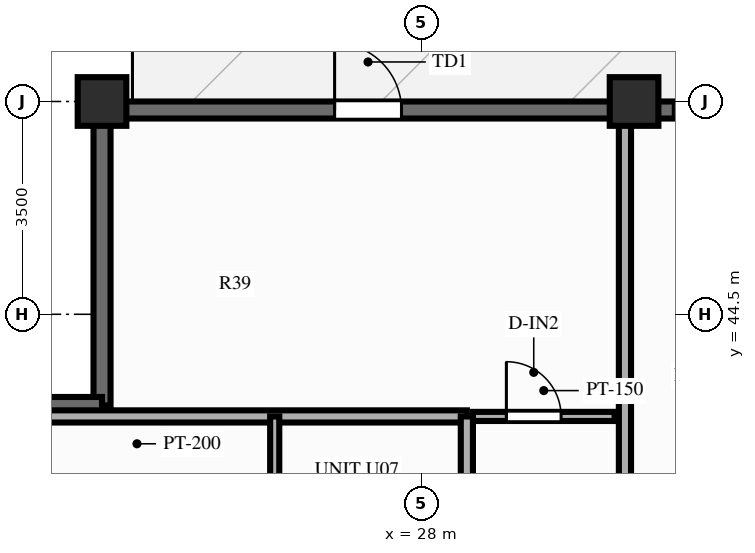
"""IFC4 building model, lengths in metres.
Left out: names, types, materials, properties, quantities, classifications, styles, units other than length and angle.
Written with IfcOpenShell. Run it as: python <this file> out.ifc"""

import sys

from ifc_helpers import new_model, si_unit, direction, frame, frame_2d, origin, origin_2d, place, context, subcontext, project, spatial, rectangle, extrude, source, transform, mapped, element, fill, save


model = new_model("IFC4")
c1 = context("Model", 3, precision=1e-05, world=origin(), true_north=direction((0.0, 1.0)))
c2 = subcontext(c1, "Body", "Model", "MODEL_VIEW")
j1 = project(units=[si_unit("LENGTHUNIT", "METRE"), si_unit("PLANEANGLEUNIT", "RADIAN")], contexts=[c1])
p1 = place(None, origin())
s1 = spatial("IfcSite", under=j1, at=p1, CompositionType="ELEMENT")
p2 = place(p1, origin())
s2 = spatial("IfcBuilding", under=s1, at=p2, CompositionType="ELEMENT")
p3 = place(p2, frame((0.0, 0.0, 179.8)))
s3 = spatial("IfcBuildingStorey", under=s2, at=p3, CompositionType="ELEMENT", Elevation=179.8)
m1 = source(origin(), c2, "Body", "SweptSolid", [
    extrude(rectangle(XDim=0.8, YDim=0.8, at=origin_2d()), origin(), (0.0, 0.0, 1.0), 3.0),
])
for number, where, z_axis, x_axis in (
    (1, (31.5, 48.0, 0.0), (0.0, 0.0, 1.0), (1.0, 0.0, 0.0)),
    (2, (22.75, 48.0, 0.0), (0.0, 0.0, 1.0), (1.0, 0.0, 0.0)),
):
    element("IfcColumn", number, at=place(p3, frame(where, z_axis=z_axis, x_axis=x_axis)), inside=s3, PredefinedType="COLUMN", context=c2, shape_type="MappedRepresentation", body=[
        mapped(m1, transform((0.0, 0.0, 0.0), scale=1.0)),
    ])
p4 = place(p3, frame((22.75, 47.86, 0.0), z_axis=(0.0, 0.0, 1.0), x_axis=(1.0, 0.0, 0.0)))
e3 = element("IfcWall", 3, at=p4, inside=s3, PredefinedType="SOLIDWALL", context=c2, shape_type="SweptSolid", body=[
    extrude(rectangle(XDim=30.5, YDim=0.28, at=frame_2d((15.25, 0.0))), origin(), (0.0, 0.0, 1.0), 2.28),
])
p5 = place(p4, frame((3.825, 0.0, 0.0)))
e4 = element("IfcOpeningElement", 4, at=p5, cuts=e3, PredefinedType="OPENING", context=c2, shape_type="SweptSolid", body=[
    extrude(rectangle(XDim=1.1, YDim=2.15, at=frame_2d((0.55, 1.075))), frame((0.0, 0.152, 0.0), z_axis=(0.0, -1.0, 0.0), x_axis=(1.0, 0.0, 0.0)), (0.0, 0.0, 1.0), 0.304),
])
p6 = place(p4, frame((9.395, 0.0, 0.25)))
e5 = element("IfcOpeningElement", 5, at=p6, cuts=e3, PredefinedType="OPENING", context=c2, shape_type="SweptSolid", body=[
    extrude(rectangle(XDim=0.95, YDim=1.5, at=frame_2d((0.475, 0.75))), frame((0.0, 0.152, 0.0), z_axis=(0.0, -1.0, 0.0), x_axis=(1.0, 0.0, 0.0)), (0.0, 0.0, 1.0), 0.304),
])
p7 = place(p4, frame((11.33, 0.0, 0.25)))
e6 = element("IfcOpeningElement", 6, at=p7, cuts=e3, PredefinedType="OPENING", context=c2, shape_type="SweptSolid", body=[
    extrude(rectangle(XDim=1.2, YDim=1.5, at=frame_2d((0.6, 0.75))), frame((0.0, 0.152, 0.0), z_axis=(0.0, -1.0, 0.0), x_axis=(1.0, 0.0, 0.0)), (0.0, 0.0, 1.0), 0.304),
])
p8 = place(p4, frame((13.894, 0.0, 0.25)))
e7 = element("IfcOpeningElement", 7, at=p8, cuts=e3, PredefinedType="OPENING", context=c2, shape_type="SweptSolid", body=[
    extrude(rectangle(XDim=1.2, YDim=1.5, at=frame_2d((0.6, 0.75))), frame((0.0, 0.152, 0.0), z_axis=(0.0, -1.0, 0.0), x_axis=(1.0, 0.0, 0.0)), (0.0, 0.0, 1.0), 0.304),
])
p9 = place(p4, frame((16.905, 0.0, 0.25)))
e8 = element("IfcOpeningElement", 8, at=p9, cuts=e3, PredefinedType="OPENING", context=c2, shape_type="SweptSolid", body=[
    extrude(rectangle(XDim=1.2, YDim=1.5, at=frame_2d((0.6, 0.75))), frame((0.0, 0.152, 0.0), z_axis=(0.0, -1.0, 0.0), x_axis=(1.0, 0.0, 0.0)), (0.0, 0.0, 1.0), 0.304),
])
p10 = place(p4, frame((19.72, 0.0, 0.25)))
e9 = element("IfcOpeningElement", 9, at=p10, cuts=e3, PredefinedType="OPENING", context=c2, shape_type="SweptSolid", body=[
    extrude(rectangle(XDim=1.2, YDim=1.5, at=frame_2d((0.6, 0.75))), frame((0.0, 0.152, 0.0), z_axis=(0.0, -1.0, 0.0), x_axis=(1.0, 0.0, 0.0)), (0.0, 0.0, 1.0), 0.304),
])
p11 = place(p4, frame((25.525, 0.0, 0.25)))
e10 = element("IfcOpeningElement", 10, at=p11, cuts=e3, PredefinedType="OPENING", context=c2, shape_type="SweptSolid", body=[
    extrude(rectangle(XDim=1.2, YDim=1.5, at=frame_2d((0.6, 0.75))), frame((0.0, 0.152, 0.0), z_axis=(0.0, -1.0, 0.0), x_axis=(1.0, 0.0, 0.0)), (0.0, 0.0, 1.0), 0.304),
])
for number, where, z_axis, x_axis in (
    (11, (22.75, 43.0, 0.0), (0.0, 0.0, 1.0), (0.0, 1.0, 0.0)),
    (12, (17.83, 43.0, 0.0), (0.0, 0.0, 1.0), (1.0, 0.0, 0.0)),
):
    element("IfcWall", number, at=place(p3, frame(where, z_axis=z_axis, x_axis=x_axis)), inside=s3, PredefinedType="SOLIDWALL", context=c2, shape_type="SweptSolid", body=[
        extrude(rectangle(XDim=4.92, YDim=0.28, at=frame_2d((2.46, 0.0))), origin(), (0.0, 0.0, 1.0), 2.28),
    ])
p12 = place(p3, frame((28.85, 42.82, 0.0), z_axis=(0.0, 0.0, 1.0), x_axis=(1.0, 0.0, 0.0)))
e13 = element("IfcWall", 13, at=p12, inside=s3, PredefinedType="PARTITIONING", context=c2, shape_type="SweptSolid", body=[
    extrude(rectangle(XDim=2.33, YDim=0.15, at=frame_2d((1.165, 0.0))), origin(), (0.0, 0.0, 1.0), 2.79),
])
p13 = place(p12, frame((0.55, 0.0, 0.0)))
e14 = element("IfcOpeningElement", 14, at=p13, cuts=e13, PredefinedType="OPENING", context=c2, shape_type="SweptSolid", body=[
    extrude(rectangle(XDim=0.9, YDim=2.1, at=frame_2d((0.45, 1.05))), frame((0.0, 0.087, 0.0), z_axis=(0.0, -1.0, 0.0), x_axis=(1.0, 0.0, 0.0)), (0.0, 0.0, 1.0), 0.174),
])
p14 = place(p3, frame((31.35, 39.05, 0.0), z_axis=(0.0, 0.0, 1.0), x_axis=(0.0, 1.0, 0.0)))
e15 = element("IfcWall", 15, at=p14, inside=s3, PredefinedType="PARTITIONING", context=c2, shape_type="SweptSolid", body=[
    extrude(rectangle(XDim=8.8, YDim=0.2, at=frame_2d((4.4, 0.0))), origin(), (0.0, 0.0, 1.0), 2.39),
])
p15 = place(p3, frame((28.75, 42.82, 0.0), z_axis=(0.0, 0.0, 1.0), x_axis=(-1.0, 0.0, 0.0)))
e16 = element("IfcWall", 16, at=p15, inside=s3, PredefinedType="PARTITIONING", context=c2, shape_type="SweptSolid", body=[
    extrude(rectangle(XDim=10.85, YDim=0.2, at=frame_2d((5.425, 0.0))), origin(), (0.0, 0.0, 1.0), 2.79),
])
p16 = place(p3, frame((28.75, 38.973, 0.0), z_axis=(0.0, 0.0, 1.0), x_axis=(0.0, 1.0, 0.0)))
e17 = element("IfcWall", 17, at=p16, inside=s3, PredefinedType="PARTITIONING", context=c2, shape_type="SweptSolid", body=[
    extrude(rectangle(XDim=3.847, YDim=0.2, at=frame_2d((1.924, 0.0))), origin(), (0.0, 0.0, 1.0), 2.79),
])
p17 = place(p3, frame((25.59, 38.973, 0.0), z_axis=(0.0, 0.0, 1.0), x_axis=(0.0, 1.0, 0.0)))
e18 = element("IfcWall", 18, at=p17, inside=s3, PredefinedType="PARTITIONING", context=c2, shape_type="SweptSolid", body=[
    extrude(rectangle(XDim=3.847, YDim=0.15, at=frame_2d((1.924, 0.0))), origin(), (0.0, 0.0, 1.0), 2.79),
])
m2 = source(origin(), c2, "Body", "SweptSolid", [
    extrude(rectangle(XDim=1.1, YDim=2.15, at=frame_2d((0.55, 1.075))), frame((0.0, 0.025, 0.0), z_axis=(0.0, -1.0, 0.0), x_axis=(1.0, 0.0, 0.0)), (0.0, 0.0, 1.0), 0.05),
])
p18 = place(p5, origin())
e19 = element("IfcDoor", 19, at=p18, inside=s3, OperationType="SINGLE_SWING_LEFT", PredefinedType="DOOR", context=c2, shape_type="MappedRepresentation", body=[
    mapped(m2, transform((0.0, 0.0, 0.0), scale=1.0)),
])
fill(e4, e19)
m3 = source(origin(), c2, "Body", "SweptSolid", [
    extrude(rectangle(XDim=0.95, YDim=1.5, at=frame_2d((0.475, 0.75))), frame((0.0, 0.03, 0.0), z_axis=(0.0, -1.0, 0.0), x_axis=(1.0, 0.0, 0.0)), (0.0, 0.0, 1.0), 0.06),
])
p19 = place(p6, origin())
e20 = element("IfcWindow", 20, at=p19, inside=s3, PartitioningType="SINGLE_PANEL", PredefinedType="WINDOW", context=c2, shape_type="MappedRepresentation", body=[
    mapped(m3, transform((0.0, 0.0, 0.0), scale=1.0)),
])
fill(e5, e20)
m4 = source(origin(), c2, "Body", "SweptSolid", [
    extrude(rectangle(XDim=0.9, YDim=2.1, at=frame_2d((0.45, 1.05))), frame((0.0, 0.025, 0.0), z_axis=(0.0, -1.0, 0.0), x_axis=(1.0, 0.0, 0.0)), (0.0, 0.0, 1.0), 0.05),
])
p20 = place(p13, origin())
e21 = element("IfcDoor", 21, at=p20, inside=s3, OperationType="SINGLE_SWING_LEFT", PredefinedType="DOOR", context=c2, shape_type="MappedRepresentation", body=[
    mapped(m4, transform((0.0, 0.0, 0.0), scale=1.0)),
])
fill(e14, e21)
save(model, sys.argv[1])
